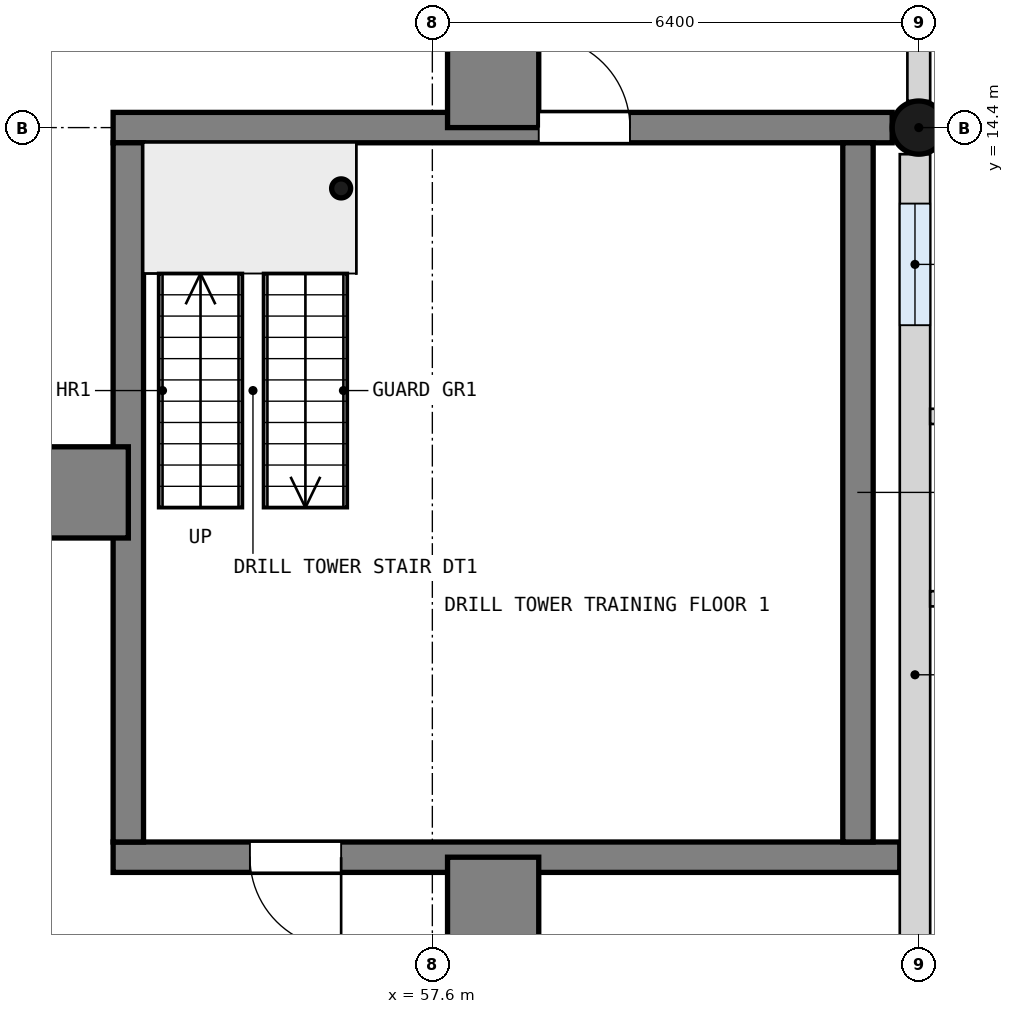
"""IFC4 building model, lengths in metres.
Left out: names, types, materials, properties, quantities, classifications, styles, units other than length and angle.
Written with IfcOpenShell. Run it as: python <this file> out.ifc"""

import sys

from ifc_helpers import new_model, si_unit, direction, frame, frame_2d, origin, origin_2d, place, context, subcontext, project, spatial, polyline, rectangle, circle, outline, extrude, element, fill, save


model = new_model("IFC4")
c1 = context("Model", 3, precision=1e-05, world=origin(), true_north=direction((0.0, 1.0)))
c2 = subcontext(c1, "Body", "Model", "MODEL_VIEW")
j1 = project(units=[si_unit("LENGTHUNIT", "METRE"), si_unit("PLANEANGLEUNIT", "RADIAN")], contexts=[c1])
p1 = place(None, origin())
s1 = spatial("IfcSite", under=j1, at=p1, CompositionType="ELEMENT")
p2 = place(p1, origin())
s2 = spatial("IfcBuilding", under=s1, at=p2, CompositionType="ELEMENT")
p3 = place(p2, origin())
s3 = spatial("IfcBuildingStorey", under=s2, at=p3, CompositionType="ELEMENT", Elevation=0.0)
p4 = place(p3, frame((64.0, 14.4, 0.0), z_axis=(0.0, 0.0, 1.0), x_axis=(1.0, 0.0, 0.0)))
e1 = element("IfcColumn", 1, at=p4, inside=s3, PredefinedType="COLUMN", context=c2, shape_type="SweptSolid", body=[
    extrude(circle(Radius=0.35, at=origin_2d()), origin(), (0.0, 0.0, 1.0), 4.2),
])
p5 = place(p3, frame((53.4, 14.4, -0.25), z_axis=(0.0, 0.0, 1.0), x_axis=(1.0, 0.0, 0.0)))
e2 = element("IfcWall", 2, at=p5, inside=s3, PredefinedType="SHEAR", context=c2, shape_type="SweptSolid", body=[
    extrude(rectangle(XDim=10.25, YDim=0.4, at=frame_2d((5.125, 0.0))), origin(), (0.0, 0.0, 1.0), 4.45),
])
p6 = place(p5, frame((5.6, 0.0, 0.25)))
e3 = element("IfcOpeningElement", 3, at=p6, cuts=e2, PredefinedType="OPENING", context=c2, shape_type="SweptSolid", body=[
    extrude(rectangle(XDim=1.2, YDim=2.1, at=frame_2d((0.6, 1.05))), frame((0.0, 0.21, 0.0), z_axis=(0.0, -1.0, 0.0), x_axis=(1.0, 0.0, 0.0)), (0.0, 0.0, 1.0), 0.42),
])
p7 = place(p3, frame((53.4, 4.8, -0.25), z_axis=(0.0, 0.0, 1.0), x_axis=(1.0, 0.0, 0.0)))
e4 = element("IfcWall", 4, at=p7, inside=s3, PredefinedType="SHEAR", context=c2, shape_type="SweptSolid", body=[
    extrude(rectangle(XDim=10.35, YDim=0.4, at=frame_2d((5.175, 0.0))), origin(), (0.0, 0.0, 1.0), 4.45),
])
p8 = place(p7, frame((1.8, 0.0, 0.25)))
e5 = element("IfcOpeningElement", 5, at=p8, cuts=e4, PredefinedType="OPENING", context=c2, shape_type="SweptSolid", body=[
    extrude(rectangle(XDim=1.2, YDim=2.1, at=frame_2d((0.6, 1.05))), frame((0.0, 0.21, 0.0), z_axis=(0.0, -1.0, 0.0), x_axis=(1.0, 0.0, 0.0)), (0.0, 0.0, 1.0), 0.42),
])
for number, where, z_axis, x_axis in (
    (6, (63.2, 5.0, -0.25), (0.0, 0.0, 1.0), (0.0, 1.0, 0.0)),
    (7, (53.6, 5.0, -0.25), (0.0, 0.0, 1.0), (0.0, 1.0, 0.0)),
):
    element("IfcWall", number, at=place(p3, frame(where, z_axis=z_axis, x_axis=x_axis)), inside=s3, PredefinedType="SHEAR", context=c2, shape_type="SweptSolid", body=[
        extrude(rectangle(XDim=9.2, YDim=0.4, at=frame_2d((4.6, 0.0))), origin(), (0.0, 0.0, 1.0), 4.45),
    ])
for number, where, z_axis, x_axis in (
    (8, (49.6, 9.6, 0.0), (0.0, 0.0, 1.0), (1.0, 0.0, 0.0)),
    (9, (58.4, 0.8, 0.0), (0.0, 0.0, 1.0), (0.0, 1.0, 0.0)),
):
    element("IfcWall", number, at=place(p3, frame(where, z_axis=z_axis, x_axis=x_axis)), inside=s3, PredefinedType="SHEAR", context=c2, shape_type="SweptSolid", body=[
        extrude(outline(polyline([(0.0, 0.0), (4.0, 0.0), (4.0, 14.0), (0.0, 0.4), (0.0, 0.0)])), frame((0.0, 0.6, 0.0), z_axis=(0.0, -1.0, 0.0), x_axis=(1.0, 0.0, 0.0)), (0.0, 0.0, 1.0), 1.2),
    ])
p9 = place(p3, frame((58.4, 17.6, 0.0), z_axis=(0.0, 0.0, 1.0), x_axis=(0.0, -1.0, 0.0)))
e10 = element("IfcWall", 10, at=p9, inside=s3, PredefinedType="SHEAR", context=c2, shape_type="SweptSolid", body=[
    extrude(outline(polyline([(0.0, 0.0), (3.2, 0.0), (3.2, 14.0), (0.0, 0.4), (0.0, 0.0)])), frame((0.0, 0.6, 0.0), z_axis=(0.0, -1.0, 0.0), x_axis=(1.0, 0.0, 0.0)), (0.0, 0.0, 1.0), 1.2),
])
p10 = place(p3, frame((63.95, 0.35, 0.0), z_axis=(0.0, 0.0, 1.0), x_axis=(0.0, 1.0, 0.0)))
e11 = element("IfcWall", 11, at=p10, inside=s3, PredefinedType="SOLIDWALL", context=c2, shape_type="SweptSolid", body=[
    extrude(rectangle(XDim=13.7, YDim=0.4, at=frame_2d((6.85, 0.0))), origin(), (0.0, 0.0, 1.0), 3.0),
])
p11 = place(p10, frame((0.65, 0.0, 0.3)))
e12 = element("IfcOpeningElement", 12, at=p11, cuts=e11, PredefinedType="OPENING", context=c2, shape_type="SweptSolid", body=[
    extrude(rectangle(XDim=1.6, YDim=2.4, at=frame_2d((0.8, 1.2))), frame((0.0, 0.21, 0.0), z_axis=(0.0, -1.0, 0.0), x_axis=(1.0, 0.0, 0.0)), (0.0, 0.0, 1.0), 0.42),
])
p12 = place(p10, frame((11.45, 0.0, 0.3)))
e13 = element("IfcOpeningElement", 13, at=p12, cuts=e11, PredefinedType="OPENING", context=c2, shape_type="SweptSolid", body=[
    extrude(rectangle(XDim=1.6, YDim=2.4, at=frame_2d((0.8, 1.2))), frame((0.0, 0.21, 0.0), z_axis=(0.0, -1.0, 0.0), x_axis=(1.0, 0.0, 0.0)), (0.0, 0.0, 1.0), 0.42),
])
p13 = place(p3, frame((64.0, 14.75, 0.0), z_axis=(0.0, 0.0, 1.0), x_axis=(0.0, 1.0, 0.0)))
e14 = element("IfcWall", 14, at=p13, inside=s3, PredefinedType="SOLIDWALL", context=c2, shape_type="SweptSolid", body=[
    extrude(rectangle(XDim=4.45, YDim=0.3, at=frame_2d((2.225, 0.0))), origin(), (0.0, 0.0, 1.0), 3.0),
])
p14 = place(p13, frame((1.25, 0.0, 0.3)))
e15 = element("IfcOpeningElement", 15, at=p14, cuts=e14, PredefinedType="OPENING", context=c2, shape_type="SweptSolid", body=[
    extrude(rectangle(XDim=1.6, YDim=2.4, at=frame_2d((0.8, 1.2))), frame((0.0, 0.16, 0.0), z_axis=(0.0, -1.0, 0.0), x_axis=(1.0, 0.0, 0.0)), (0.0, 0.0, 1.0), 0.32),
])
p15 = place(p3, frame((74.6, 8.2, 0.0), z_axis=(0.0, 0.0, 1.0), x_axis=(-1.0, 0.0, 0.0)))
e16 = element("IfcWall", 16, at=p15, inside=s3, PredefinedType="PARTITIONING", context=c2, shape_type="SweptSolid", body=[
    extrude(rectangle(XDim=10.45, YDim=0.2, at=frame_2d((5.225, 0.0))), origin(), (0.0, 0.0, 1.0), 3.9),
])
p16 = place(p15, frame((4.4, 0.0, 0.0)))
e17 = element("IfcOpeningElement", 17, at=p16, cuts=e16, PredefinedType="OPENING", context=c2, shape_type="SweptSolid", body=[
    extrude(rectangle(XDim=1.8, YDim=2.1, at=frame_2d((0.9, 1.05))), frame((0.0, 0.11, 0.0), z_axis=(0.0, -1.0, 0.0), x_axis=(1.0, 0.0, 0.0)), (0.0, 0.0, 1.0), 0.22),
])
p17 = place(p3, frame((69.7, 10.6, 0.0), z_axis=(0.0, 0.0, 1.0), x_axis=(-1.0, 0.0, 0.0)))
e18 = element("IfcWall", 18, at=p17, inside=s3, PredefinedType="PARTITIONING", context=c2, shape_type="SweptSolid", body=[
    extrude(rectangle(XDim=5.55, YDim=0.2, at=frame_2d((2.775, 0.0))), origin(), (0.0, 0.0, 1.0), 3.9),
])
p18 = place(p3, frame((56.4, 13.6, 0.0), z_axis=(0.0, 0.0, 1.0), x_axis=(1.0, 0.0, 0.0)))
e19 = element("IfcColumn", 19, at=p18, inside=s3, PredefinedType="COLUMN", context=c2, shape_type="SweptSolid", body=[
    extrude(circle(Radius=0.125, at=origin_2d()), origin(), (0.0, 0.0, 1.0), 4.2),
])
p19 = place(p6, origin())
e20 = element("IfcDoor", 20, at=p19, inside=s3, OperationType="SINGLE_SWING_LEFT", PredefinedType="DOOR", context=c2, shape_type="SweptSolid", body=[
    extrude(rectangle(XDim=1.2, YDim=2.1, at=frame_2d((0.6, 1.05))), frame((0.0, 0.025, 0.0), z_axis=(0.0, -1.0, 0.0), x_axis=(1.0, 0.0, 0.0)), (0.0, 0.0, 1.0), 0.05),
])
fill(e3, e20)
p20 = place(p8, frame((1.2, 0.0, 0.0), z_axis=(0.0, 0.0, 1.0), x_axis=(-1.0, 0.0, 0.0)))
e21 = element("IfcDoor", 21, at=p20, inside=s3, OperationType="SINGLE_SWING_LEFT", PredefinedType="DOOR", context=c2, shape_type="SweptSolid", body=[
    extrude(rectangle(XDim=1.2, YDim=2.1, at=frame_2d((0.6, 1.05))), frame((0.0, 0.025, 0.0), z_axis=(0.0, -1.0, 0.0), x_axis=(1.0, 0.0, 0.0)), (0.0, 0.0, 1.0), 0.05),
])
fill(e5, e21)
p21 = place(p12, origin())
e22 = element("IfcWindow", 22, at=p21, inside=s3, PartitioningType="SINGLE_PANEL", PredefinedType="WINDOW", context=c2, shape_type="SweptSolid", body=[
    extrude(rectangle(XDim=1.6, YDim=2.4, at=frame_2d((0.8, 1.2))), frame((0.0, 0.03, 0.0), z_axis=(0.0, -1.0, 0.0), x_axis=(1.0, 0.0, 0.0)), (0.0, 0.0, 1.0), 0.06),
])
fill(e13, e22)
save(model, sys.argv[1])
